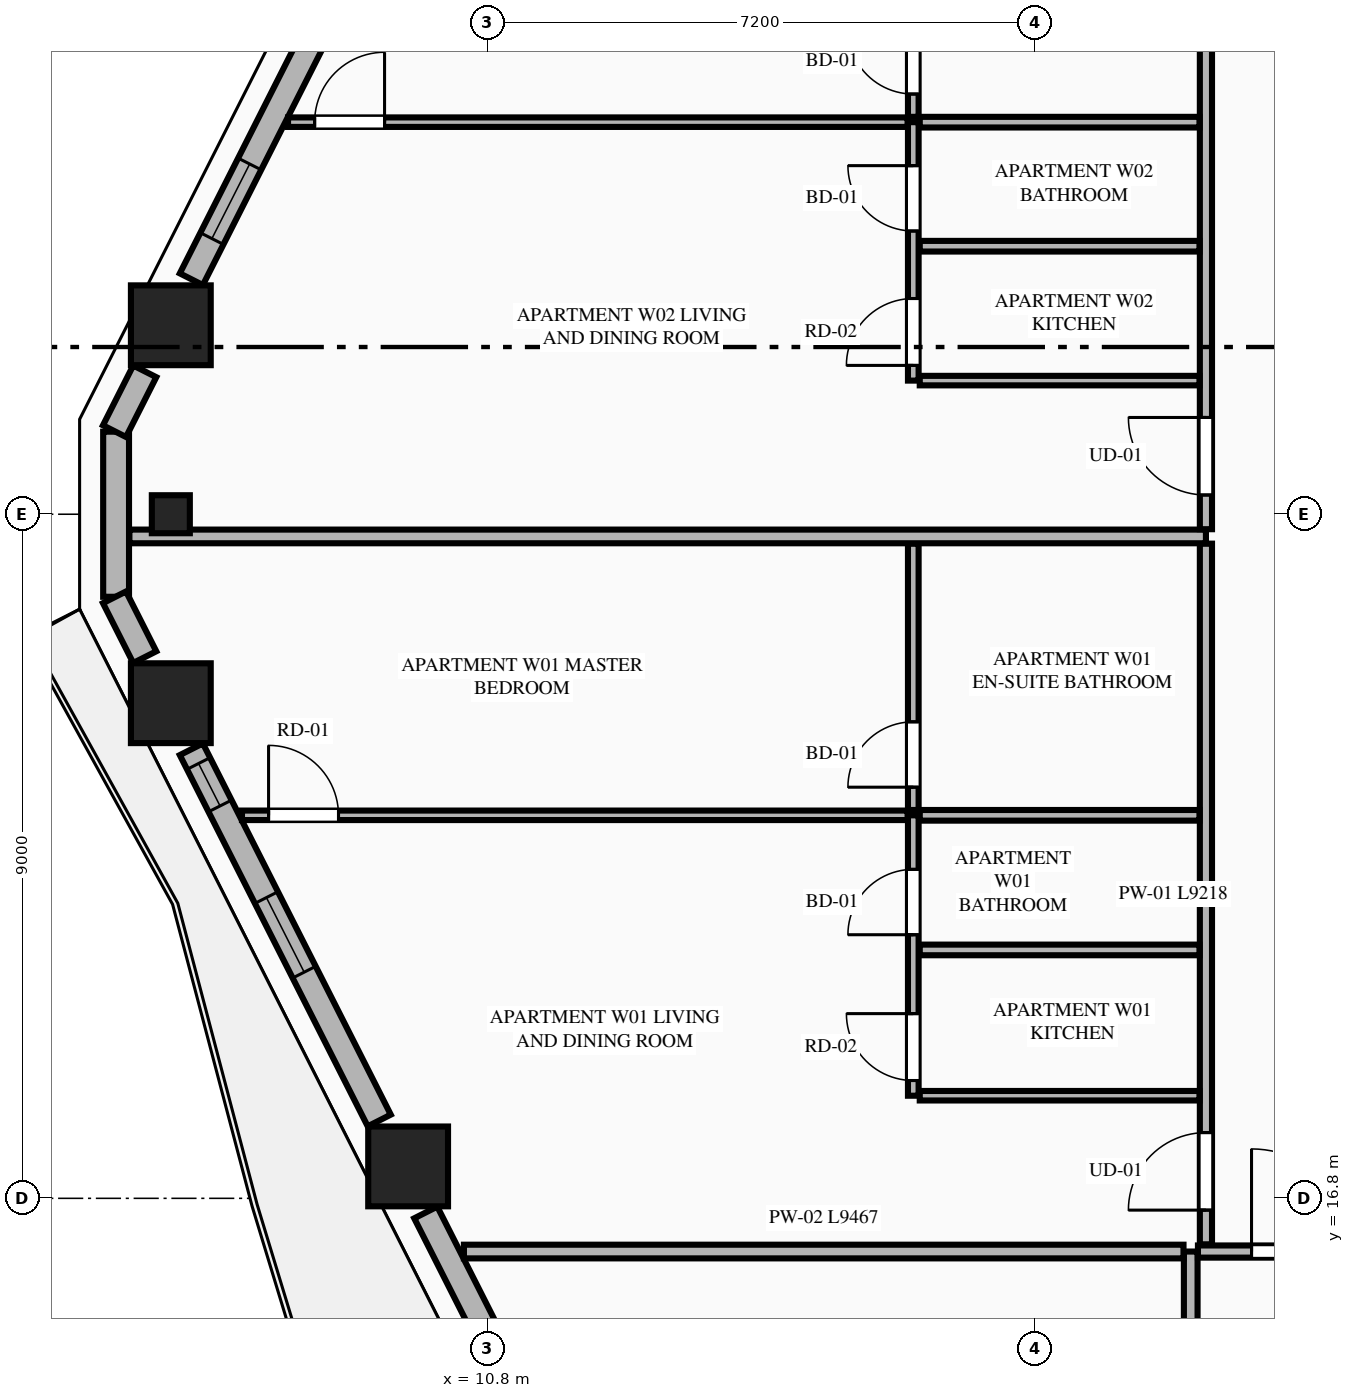
"""IFC4 building model, lengths in metres.
Left out: names, types, materials, properties, quantities, classifications, styles, units other than length and angle.
Written with IfcOpenShell. Run it as: python <this file> out.ifc"""

import sys

from ifc_helpers import new_model, si_unit, direction, frame, frame_2d, origin, origin_2d, place, context, subcontext, project, spatial, rectangle, extrude, element, fill, save


model = new_model("IFC4")
c1 = context("Model", 3, precision=1e-05, world=origin(), true_north=direction((0.0, 1.0)))
c2 = subcontext(c1, "Body", "Model", "MODEL_VIEW")
j1 = project(units=[si_unit("LENGTHUNIT", "METRE"), si_unit("PLANEANGLEUNIT", "RADIAN")], contexts=[c1])
p1 = place(None, origin())
s1 = spatial("IfcSite", under=j1, at=p1, CompositionType="ELEMENT")
p2 = place(p1, origin())
s2 = spatial("IfcBuilding", under=s1, at=p2, CompositionType="ELEMENT")
p3 = place(p2, frame((0.0, 0.0, 90.65)))
s3 = spatial("IfcBuildingStorey", under=s2, at=p3, CompositionType="ELEMENT", Elevation=90.65)
for number, where, z_axis, x_axis in (
    (1, (6.632, 28.286, 0.0), (0.0, 0.0, 1.0), (1.0, 0.0, 0.0)),
    (2, (6.632, 23.314, 0.0), (0.0, 0.0, 1.0), (1.0, 0.0, 0.0)),
    (3, (9.754, 17.22, 0.0), (0.0, 0.0, 1.0), (1.0, 0.0, 0.0)),
):
    element("IfcColumn", number, at=place(p3, frame(where, z_axis=z_axis, x_axis=x_axis)), inside=s3, PredefinedType="COLUMN", context=c2, shape_type="SweptSolid", body=[
        extrude(rectangle(XDim=1.05, YDim=1.05, at=origin_2d()), origin(), (0.0, 0.0, 1.0), 3.55),
    ])
p4 = place(p3, frame((6.632, 25.8, 0.0), z_axis=(0.0, 0.0, 1.0), x_axis=(0.0, -1.0, 0.0)))
e4 = element("IfcColumn", 4, at=p4, inside=s3, PredefinedType="PILASTER", context=c2, shape_type="SweptSolid", body=[
    extrude(rectangle(XDim=0.5, YDim=0.35, at=origin_2d()), origin(), (0.0, 0.0, 1.0), 3.55),
])
p5 = place(p3, frame((5.912, 26.886, 0.0), z_axis=(0.0, 0.0, 1.0), x_axis=(0.0, -1.0, 0.0)))
e5 = element("IfcWall", 5, at=p5, inside=s3, PredefinedType="STANDARD", context=c2, shape_type="SweptSolid", body=[
    extrude(rectangle(XDim=2.172, YDim=0.34, at=frame_2d((1.086, 0.0))), origin(), (0.0, 0.0, 1.0), 3.33),
])
p6 = place(p3, frame((9.374, 33.776, 0.0), z_axis=(0.0, 0.0, 1.0), x_axis=(-0.451597066012, -0.892221995901, 0.0)))
e6 = element("IfcWall", 6, at=p6, inside=s3, PredefinedType="STANDARD", context=c2, shape_type="SweptSolid", body=[
    extrude(rectangle(XDim=5.474, YDim=0.34, at=frame_2d((2.737, 0.0))), origin(), (0.0, 0.0, 1.0), 2.712),
])
p7 = place(p6, frame((0.918, 0.0, 0.75)))
e7 = element("IfcOpeningElement", 7, at=p7, cuts=e6, PredefinedType="OPENING", context=c2, shape_type="SweptSolid", body=[
    extrude(rectangle(XDim=1.1, YDim=1.812, at=frame_2d((0.55, 0.906))), frame((0.0, 0.18, 0.0), z_axis=(0.0, -1.0, 0.0), x_axis=(1.0, 0.0, 0.0)), (0.0, 0.0, 1.0), 0.36),
])
p8 = place(p6, frame((3.775, 0.0, 0.75)))
e8 = element("IfcOpeningElement", 8, at=p8, cuts=e6, PredefinedType="OPENING", context=c2, shape_type="SweptSolid", body=[
    extrude(rectangle(XDim=1.1, YDim=1.812, at=frame_2d((0.55, 0.906))), frame((0.0, 0.18, 0.0), z_axis=(0.0, -1.0, 0.0), x_axis=(1.0, 0.0, 0.0)), (0.0, 0.0, 1.0), 0.36),
])
p9 = place(p3, frame((6.289, 27.68, 0.0), z_axis=(0.0, 0.0, 1.0), x_axis=(-0.451306655769, -0.892368927327, 0.0)))
e9 = element("IfcWall", 9, at=p9, inside=s3, PredefinedType="STANDARD", context=c2, shape_type="SweptSolid", body=[
    extrude(rectangle(XDim=0.882, YDim=0.34, at=frame_2d((0.441, 0.0))), origin(), (0.0, 0.0, 1.0), 3.33),
])
p10 = place(p3, frame((5.891, 24.707, 0.0), z_axis=(0.0, 0.0, 1.0), x_axis=(0.451195173259, -0.892425299747, 0.0)))
e10 = element("IfcWall", 10, at=p10, inside=s3, PredefinedType="STANDARD", context=c2, shape_type="SweptSolid", body=[
    extrude(rectangle(XDim=0.882, YDim=0.34, at=frame_2d((0.441, 0.0))), origin(), (0.0, 0.0, 1.0), 3.33),
])
p11 = place(p3, frame((6.902, 22.708, 0.0), z_axis=(0.0, 0.0, 1.0), x_axis=(0.451579095309, -0.892231091523, 0.0)))
e11 = element("IfcWall", 11, at=p11, inside=s3, PredefinedType="STANDARD", context=c2, shape_type="SweptSolid", body=[
    extrude(rectangle(XDim=5.474, YDim=0.34, at=frame_2d((2.737, 0.0))), origin(), (0.0, 0.0, 1.0), 2.712),
])
p12 = place(p11, frame((2.187, 0.0, 0.75)))
e12 = element("IfcOpeningElement", 12, at=p12, cuts=e11, PredefinedType="OPENING", context=c2, shape_type="SweptSolid", body=[
    extrude(rectangle(XDim=1.1, YDim=1.812, at=frame_2d((0.55, 0.906))), frame((0.0, 0.18, 0.0), z_axis=(0.0, -1.0, 0.0), x_axis=(1.0, 0.0, 0.0)), (0.0, 0.0, 1.0), 0.36),
])
p13 = place(p11, frame((0.21, 0.0, 0.75)))
e13 = element("IfcOpeningElement", 13, at=p13, cuts=e11, PredefinedType="OPENING", context=c2, shape_type="SweptSolid", body=[
    extrude(rectangle(XDim=0.626, YDim=1.812, at=frame_2d((0.313, 0.906))), frame((0.0, 0.18, 0.0), z_axis=(0.0, -1.0, 0.0), x_axis=(1.0, 0.0, 0.0)), (0.0, 0.0, 1.0), 0.36),
])
p14 = place(p3, frame((9.986, 16.614, 0.0), z_axis=(0.0, 0.0, 1.0), x_axis=(0.45158267371, -0.892229280401, 0.0)))
e14 = element("IfcWall", 14, at=p14, inside=s3, PredefinedType="STANDARD", context=c2, shape_type="SweptSolid", body=[
    extrude(rectangle(XDim=5.715, YDim=0.34, at=frame_2d((2.857, 0.0))), origin(), (0.0, 0.0, 1.0), 2.712),
])
p15 = place(p14, frame((2.721, 0.0, 0.0)))
e15 = element("IfcOpeningElement", 15, at=p15, cuts=e14, PredefinedType="OPENING", context=c2, shape_type="SweptSolid", body=[
    extrude(rectangle(XDim=1.1, YDim=2.25, at=frame_2d((0.55, 1.125))), frame((0.0, 0.18, 0.0), z_axis=(0.0, -1.0, 0.0), x_axis=(1.0, 0.0, 0.0)), (0.0, 0.0, 1.0), 0.36),
])
p16 = place(p3, frame((20.05, 2.455, 0.0), z_axis=(0.0, 0.0, 1.0), x_axis=(0.0, 1.0, 0.0)))
e16 = element("IfcWall", 16, at=p16, inside=s3, PredefinedType="PARTITIONING", context=c2, shape_type="SweptSolid", body=[
    extrude(rectangle(XDim=13.645, YDim=0.18, at=frame_2d((6.823, 0.0))), origin(), (0.0, 0.0, 1.0), 3.33),
])
p17 = place(p3, frame((20.145, 16.1, 0.0), z_axis=(0.0, 0.0, 1.0), x_axis=(1.0, 0.0, 0.0)))
e17 = element("IfcWall", 17, at=p17, inside=s3, PredefinedType="PARTITIONING", context=c2, shape_type="SweptSolid", body=[
    extrude(rectangle(XDim=16.282, YDim=0.16, at=frame_2d((8.141, 0.0))), origin(), (0.0, 0.0, 1.0), 3.33),
])
p18 = place(p17, frame((0.705, 0.0, 0.0)))
e18 = element("IfcOpeningElement", 18, at=p18, cuts=e17, PredefinedType="OPENING", context=c2, shape_type="SweptSolid", body=[
    extrude(rectangle(XDim=1.35, YDim=2.35, at=frame_2d((0.675, 1.175))), frame((0.0, 0.09, 0.0), z_axis=(0.0, -1.0, 0.0), x_axis=(1.0, 0.0, 0.0)), (0.0, 0.0, 1.0), 0.18),
])
p19 = place(p3, frame((10.488, 16.1, 0.0), z_axis=(0.0, 0.0, 1.0), x_axis=(1.0, 0.0, 0.0)))
e19 = element("IfcWall", 19, at=p19, inside=s3, PredefinedType="PARTITIONING", context=c2, shape_type="SweptSolid", body=[
    extrude(rectangle(XDim=9.467, YDim=0.18, at=frame_2d((4.733, 0.0))), origin(), (0.0, 0.0, 1.0), 3.33),
])
p20 = place(p3, frame((20.25, 16.195, 0.0), z_axis=(0.0, 0.0, 1.0), x_axis=(0.0, 1.0, 0.0)))
e20 = element("IfcWall", 20, at=p20, inside=s3, PredefinedType="PARTITIONING", context=c2, shape_type="SweptSolid", body=[
    extrude(rectangle(XDim=9.218, YDim=0.16, at=frame_2d((4.609, 0.0))), origin(), (0.0, 0.0, 1.0), 2.637),
])
p21 = place(p20, frame((0.45, 0.0, 0.0)))
e21 = element("IfcOpeningElement", 21, at=p21, cuts=e20, PredefinedType="OPENING", context=c2, shape_type="SweptSolid", body=[
    extrude(rectangle(XDim=1.02, YDim=2.25, at=frame_2d((0.51, 1.125))), frame((0.0, 0.09, 0.0), z_axis=(0.0, -1.0, 0.0), x_axis=(1.0, 0.0, 0.0)), (0.0, 0.0, 1.0), 0.18),
])
p22 = place(p3, frame((16.485, 18.15, 0.0), z_axis=(0.0, 0.0, 1.0), x_axis=(1.0, 0.0, 0.0)))
e22 = element("IfcWall", 22, at=p22, inside=s3, PredefinedType="PARTITIONING", context=c2, shape_type="SweptSolid", body=[
    extrude(rectangle(XDim=3.68, YDim=0.125, at=frame_2d((1.84, 0.0))), origin(), (0.0, 0.0, 1.0), 2.637),
])
p23 = place(p3, frame((16.4, 18.15, 0.0), z_axis=(0.0, 0.0, 1.0), x_axis=(0.0, 1.0, 0.0)))
e23 = element("IfcWall", 23, at=p23, inside=s3, PredefinedType="PLUMBINGWALL", context=c2, shape_type="SweptSolid", body=[
    extrude(rectangle(XDim=3.689, YDim=0.14, at=frame_2d((1.845, 0.0))), origin(), (0.0, 0.0, 1.0), 3.33),
])
p24 = place(p23, frame((0.2, 0.0, 0.0)))
e24 = element("IfcOpeningElement", 24, at=p24, cuts=e23, PredefinedType="OPENING", context=c2, shape_type="SweptSolid", body=[
    extrude(rectangle(XDim=0.88, YDim=2.15, at=frame_2d((0.44, 1.075))), frame((0.0, 0.08, 0.0), z_axis=(0.0, -1.0, 0.0), x_axis=(1.0, 0.0, 0.0)), (0.0, 0.0, 1.0), 0.16),
])
p25 = place(p23, frame((2.118, 0.0, 0.0)))
e25 = element("IfcOpeningElement", 25, at=p25, cuts=e23, PredefinedType="OPENING", context=c2, shape_type="SweptSolid", body=[
    extrude(rectangle(XDim=0.86, YDim=2.1, at=frame_2d((0.43, 1.05))), frame((0.0, 0.08, 0.0), z_axis=(0.0, -1.0, 0.0), x_axis=(1.0, 0.0, 0.0)), (0.0, 0.0, 1.0), 0.16),
])
p26 = place(p3, frame((16.4, 21.909, 0.0), z_axis=(0.0, 0.0, 1.0), x_axis=(0.0, 1.0, 0.0)))
e26 = element("IfcWall", 26, at=p26, inside=s3, PredefinedType="PLUMBINGWALL", context=c2, shape_type="SweptSolid", body=[
    extrude(rectangle(XDim=3.504, YDim=0.14, at=frame_2d((1.752, 0.0))), origin(), (0.0, 0.0, 1.0), 3.33),
])
p27 = place(p26, frame((0.3, 0.0, 0.0)))
e27 = element("IfcOpeningElement", 27, at=p27, cuts=e26, PredefinedType="OPENING", context=c2, shape_type="SweptSolid", body=[
    extrude(rectangle(XDim=0.86, YDim=2.1, at=frame_2d((0.43, 1.05))), frame((0.0, 0.08, 0.0), z_axis=(0.0, -1.0, 0.0), x_axis=(1.0, 0.0, 0.0)), (0.0, 0.0, 1.0), 0.16),
])
p28 = place(p3, frame((16.485, 21.839, 0.0), z_axis=(0.0, 0.0, 1.0), x_axis=(1.0, 0.0, 0.0)))
e28 = element("IfcWall", 28, at=p28, inside=s3, PredefinedType="PLUMBINGWALL", context=c2, shape_type="SweptSolid", body=[
    extrude(rectangle(XDim=3.68, YDim=0.14, at=frame_2d((1.84, 0.0))), origin(), (0.0, 0.0, 1.0), 3.33),
])
p29 = place(p3, frame((7.568, 21.839, 0.0), z_axis=(0.0, 0.0, 1.0), x_axis=(1.0, 0.0, 0.0)))
e29 = element("IfcWall", 29, at=p29, inside=s3, PredefinedType="PARTITIONING", context=c2, shape_type="SweptSolid", body=[
    extrude(rectangle(XDim=8.757, YDim=0.125, at=frame_2d((4.378, 0.0))), origin(), (0.0, 0.0, 1.0), 3.33),
])
p30 = place(p29, frame((0.35, 0.0, 0.0)))
e30 = element("IfcOpeningElement", 30, at=p30, cuts=e29, PredefinedType="OPENING", context=c2, shape_type="SweptSolid", body=[
    extrude(rectangle(XDim=0.92, YDim=2.15, at=frame_2d((0.46, 1.075))), frame((0.0, 0.073, 0.0), z_axis=(0.0, -1.0, 0.0), x_axis=(1.0, 0.0, 0.0)), (0.0, 0.0, 1.0), 0.145),
])
p31 = place(p3, frame((16.485, 20.068, 0.0), z_axis=(0.0, 0.0, 1.0), x_axis=(1.0, 0.0, 0.0)))
e31 = element("IfcWall", 31, at=p31, inside=s3, PredefinedType="PLUMBINGWALL", context=c2, shape_type="SweptSolid", body=[
    extrude(rectangle(XDim=3.68, YDim=0.14, at=frame_2d((1.84, 0.0))), origin(), (0.0, 0.0, 1.0), 3.33),
])
p32 = place(p3, frame((6.087, 25.508, 0.0), z_axis=(0.0, 0.0, 1.0), x_axis=(1.0, 0.0, 0.0)))
e32 = element("IfcWall", 32, at=p32, inside=s3, PredefinedType="PARTITIONING", context=c2, shape_type="SweptSolid", body=[
    extrude(rectangle(XDim=14.163, YDim=0.18, at=frame_2d((7.082, 0.0))), origin(), (0.0, 0.0, 1.0), 3.33),
])
p33 = place(p3, frame((20.25, 25.603, 0.0), z_axis=(0.0, 0.0, 1.0), x_axis=(0.0, 1.0, 0.0)))
e33 = element("IfcWall", 33, at=p33, inside=s3, PredefinedType="PARTITIONING", context=c2, shape_type="SweptSolid", body=[
    extrude(rectangle(XDim=10.002, YDim=0.16, at=frame_2d((5.001, 0.0))), origin(), (0.0, 0.0, 1.0), 2.637),
])
p34 = place(p33, frame((0.45, 0.0, 0.0)))
e34 = element("IfcOpeningElement", 34, at=p34, cuts=e33, PredefinedType="OPENING", context=c2, shape_type="SweptSolid", body=[
    extrude(rectangle(XDim=1.02, YDim=2.25, at=frame_2d((0.51, 1.125))), frame((0.0, 0.09, 0.0), z_axis=(0.0, -1.0, 0.0), x_axis=(1.0, 0.0, 0.0)), (0.0, 0.0, 1.0), 0.18),
])
p35 = place(p3, frame((16.485, 27.558, 0.0), z_axis=(0.0, 0.0, 1.0), x_axis=(1.0, 0.0, 0.0)))
e35 = element("IfcWall", 35, at=p35, inside=s3, PredefinedType="PARTITIONING", context=c2, shape_type="SweptSolid", body=[
    extrude(rectangle(XDim=3.68, YDim=0.125, at=frame_2d((1.84, 0.0))), origin(), (0.0, 0.0, 1.0), 3.33),
])
p36 = place(p3, frame((16.4, 27.558, 0.0), z_axis=(0.0, 0.0, 1.0), x_axis=(0.0, 1.0, 0.0)))
e36 = element("IfcWall", 36, at=p36, inside=s3, PredefinedType="PLUMBINGWALL", context=c2, shape_type="SweptSolid", body=[
    extrude(rectangle(XDim=3.4, YDim=0.14, at=frame_2d((1.7, 0.0))), origin(), (0.0, 0.0, 1.0), 3.33),
])
p37 = place(p36, frame((0.2, 0.0, 0.0)))
e37 = element("IfcOpeningElement", 37, at=p37, cuts=e36, PredefinedType="OPENING", context=c2, shape_type="SweptSolid", body=[
    extrude(rectangle(XDim=0.88, YDim=2.15, at=frame_2d((0.44, 1.075))), frame((0.0, 0.08, 0.0), z_axis=(0.0, -1.0, 0.0), x_axis=(1.0, 0.0, 0.0)), (0.0, 0.0, 1.0), 0.16),
])
p38 = place(p36, frame((1.968, 0.0, 0.0)))
e38 = element("IfcOpeningElement", 38, at=p38, cuts=e36, PredefinedType="OPENING", context=c2, shape_type="SweptSolid", body=[
    extrude(rectangle(XDim=0.86, YDim=2.1, at=frame_2d((0.43, 1.05))), frame((0.0, 0.08, 0.0), z_axis=(0.0, -1.0, 0.0), x_axis=(1.0, 0.0, 0.0)), (0.0, 0.0, 1.0), 0.16),
])
p39 = place(p3, frame((16.4, 31.028, 0.0), z_axis=(0.0, 0.0, 1.0), x_axis=(0.0, 1.0, 0.0)))
e39 = element("IfcWall", 39, at=p39, inside=s3, PredefinedType="PLUMBINGWALL", context=c2, shape_type="SweptSolid", body=[
    extrude(rectangle(XDim=4.577, YDim=0.14, at=frame_2d((2.289, 0.0))), origin(), (0.0, 0.0, 1.0), 3.33),
])
p40 = place(p39, frame((0.3, 0.0, 0.0)))
e40 = element("IfcOpeningElement", 40, at=p40, cuts=e39, PredefinedType="OPENING", context=c2, shape_type="SweptSolid", body=[
    extrude(rectangle(XDim=0.86, YDim=2.1, at=frame_2d((0.43, 1.05))), frame((0.0, 0.08, 0.0), z_axis=(0.0, -1.0, 0.0), x_axis=(1.0, 0.0, 0.0)), (0.0, 0.0, 1.0), 0.16),
])
p41 = place(p3, frame((16.485, 30.958, 0.0), z_axis=(0.0, 0.0, 1.0), x_axis=(1.0, 0.0, 0.0)))
e41 = element("IfcWall", 41, at=p41, inside=s3, PredefinedType="PLUMBINGWALL", context=c2, shape_type="SweptSolid", body=[
    extrude(rectangle(XDim=3.68, YDim=0.14, at=frame_2d((1.84, 0.0))), origin(), (0.0, 0.0, 1.0), 3.33),
])
p42 = place(p3, frame((8.174, 30.958, 0.0), z_axis=(0.0, 0.0, 1.0), x_axis=(1.0, 0.0, 0.0)))
e42 = element("IfcWall", 42, at=p42, inside=s3, PredefinedType="PARTITIONING", context=c2, shape_type="SweptSolid", body=[
    extrude(rectangle(XDim=8.151, YDim=0.125, at=frame_2d((4.075, 0.0))), origin(), (0.0, 0.0, 1.0), 3.33),
])
p43 = place(p42, frame((0.35, 0.0, 0.0)))
e43 = element("IfcOpeningElement", 43, at=p43, cuts=e42, PredefinedType="OPENING", context=c2, shape_type="SweptSolid", body=[
    extrude(rectangle(XDim=0.92, YDim=2.15, at=frame_2d((0.46, 1.075))), frame((0.0, 0.073, 0.0), z_axis=(0.0, -1.0, 0.0), x_axis=(1.0, 0.0, 0.0)), (0.0, 0.0, 1.0), 0.145),
])
p44 = place(p3, frame((16.485, 29.326, 0.0), z_axis=(0.0, 0.0, 1.0), x_axis=(1.0, 0.0, 0.0)))
e44 = element("IfcWall", 44, at=p44, inside=s3, PredefinedType="PLUMBINGWALL", context=c2, shape_type="SweptSolid", body=[
    extrude(rectangle(XDim=3.68, YDim=0.14, at=frame_2d((1.84, 0.0))), origin(), (0.0, 0.0, 1.0), 3.33),
])
p45 = place(p12, origin())
e45 = element("IfcWindow", 45, at=p45, inside=s3, PartitioningType="SINGLE_PANEL", PredefinedType="WINDOW", context=c2, shape_type="SweptSolid", body=[
    extrude(rectangle(XDim=1.1, YDim=1.812, at=frame_2d((0.55, 0.906))), frame((0.0, 0.03, 0.0), z_axis=(0.0, -1.0, 0.0), x_axis=(1.0, 0.0, 0.0)), (0.0, 0.0, 1.0), 0.06),
])
fill(e12, e45)
p46 = place(p18, origin())
e46 = element("IfcDoor", 46, at=p46, inside=s3, OperationType="SINGLE_SWING_LEFT", PredefinedType="DOOR", context=c2, shape_type="SweptSolid", body=[
    extrude(rectangle(XDim=1.35, YDim=2.35, at=frame_2d((0.675, 1.175))), frame((0.0, 0.025, 0.0), z_axis=(0.0, -1.0, 0.0), x_axis=(1.0, 0.0, 0.0)), (0.0, 0.0, 1.0), 0.05),
])
fill(e18, e46)
p47 = place(p24, origin())
e47 = element("IfcDoor", 47, at=p47, inside=s3, OperationType="SINGLE_SWING_RIGHT", PredefinedType="DOOR", context=c2, shape_type="SweptSolid", body=[
    extrude(rectangle(XDim=0.88, YDim=2.15, at=frame_2d((0.44, 1.075))), frame((0.0, 0.025, 0.0), z_axis=(0.0, -1.0, 0.0), x_axis=(1.0, 0.0, 0.0)), (0.0, 0.0, 1.0), 0.05),
])
fill(e24, e47)
p48 = place(p25, origin())
e48 = element("IfcDoor", 48, at=p48, inside=s3, OperationType="SINGLE_SWING_LEFT", PredefinedType="DOOR", context=c2, shape_type="SweptSolid", body=[
    extrude(rectangle(XDim=0.86, YDim=2.1, at=frame_2d((0.43, 1.05))), frame((0.0, 0.025, 0.0), z_axis=(0.0, -1.0, 0.0), x_axis=(1.0, 0.0, 0.0)), (0.0, 0.0, 1.0), 0.05),
])
fill(e25, e48)
p49 = place(p27, origin())
e49 = element("IfcDoor", 49, at=p49, inside=s3, OperationType="SINGLE_SWING_LEFT", PredefinedType="DOOR", context=c2, shape_type="SweptSolid", body=[
    extrude(rectangle(XDim=0.86, YDim=2.1, at=frame_2d((0.43, 1.05))), frame((0.0, 0.025, 0.0), z_axis=(0.0, -1.0, 0.0), x_axis=(1.0, 0.0, 0.0)), (0.0, 0.0, 1.0), 0.05),
])
fill(e27, e49)
p50 = place(p21, origin())
e50 = element("IfcDoor", 50, at=p50, inside=s3, OperationType="SINGLE_SWING_LEFT", PredefinedType="DOOR", context=c2, shape_type="SweptSolid", body=[
    extrude(rectangle(XDim=1.02, YDim=2.25, at=frame_2d((0.51, 1.125))), frame((0.0, 0.025, 0.0), z_axis=(0.0, -1.0, 0.0), x_axis=(1.0, 0.0, 0.0)), (0.0, 0.0, 1.0), 0.05),
])
fill(e21, e50)
p51 = place(p30, origin())
e51 = element("IfcDoor", 51, at=p51, inside=s3, OperationType="SINGLE_SWING_LEFT", PredefinedType="DOOR", context=c2, shape_type="SweptSolid", body=[
    extrude(rectangle(XDim=0.92, YDim=2.15, at=frame_2d((0.46, 1.075))), frame((0.0, 0.025, 0.0), z_axis=(0.0, -1.0, 0.0), x_axis=(1.0, 0.0, 0.0)), (0.0, 0.0, 1.0), 0.05),
])
fill(e30, e51)
p52 = place(p37, origin())
e52 = element("IfcDoor", 52, at=p52, inside=s3, OperationType="SINGLE_SWING_LEFT", PredefinedType="DOOR", context=c2, shape_type="SweptSolid", body=[
    extrude(rectangle(XDim=0.88, YDim=2.15, at=frame_2d((0.44, 1.075))), frame((0.0, 0.025, 0.0), z_axis=(0.0, -1.0, 0.0), x_axis=(1.0, 0.0, 0.0)), (0.0, 0.0, 1.0), 0.05),
])
fill(e37, e52)
p53 = place(p38, origin())
e53 = element("IfcDoor", 53, at=p53, inside=s3, OperationType="SINGLE_SWING_RIGHT", PredefinedType="DOOR", context=c2, shape_type="SweptSolid", body=[
    extrude(rectangle(XDim=0.86, YDim=2.1, at=frame_2d((0.43, 1.05))), frame((0.0, 0.025, 0.0), z_axis=(0.0, -1.0, 0.0), x_axis=(1.0, 0.0, 0.0)), (0.0, 0.0, 1.0), 0.05),
])
fill(e38, e53)
p54 = place(p40, origin())
e54 = element("IfcDoor", 54, at=p54, inside=s3, OperationType="SINGLE_SWING_RIGHT", PredefinedType="DOOR", context=c2, shape_type="SweptSolid", body=[
    extrude(rectangle(XDim=0.86, YDim=2.1, at=frame_2d((0.43, 1.05))), frame((0.0, 0.025, 0.0), z_axis=(0.0, -1.0, 0.0), x_axis=(1.0, 0.0, 0.0)), (0.0, 0.0, 1.0), 0.05),
])
fill(e40, e54)
p55 = place(p34, origin())
e55 = element("IfcDoor", 55, at=p55, inside=s3, OperationType="SINGLE_SWING_RIGHT", PredefinedType="DOOR", context=c2, shape_type="SweptSolid", body=[
    extrude(rectangle(XDim=1.02, YDim=2.25, at=frame_2d((0.51, 1.125))), frame((0.0, 0.025, 0.0), z_axis=(0.0, -1.0, 0.0), x_axis=(1.0, 0.0, 0.0)), (0.0, 0.0, 1.0), 0.05),
])
fill(e34, e55)
p56 = place(p43, origin())
e56 = element("IfcDoor", 56, at=p56, inside=s3, OperationType="SINGLE_SWING_RIGHT", PredefinedType="DOOR", context=c2, shape_type="SweptSolid", body=[
    extrude(rectangle(XDim=0.92, YDim=2.15, at=frame_2d((0.46, 1.075))), frame((0.0, 0.025, 0.0), z_axis=(0.0, -1.0, 0.0), x_axis=(1.0, 0.0, 0.0)), (0.0, 0.0, 1.0), 0.05),
])
fill(e43, e56)
p57 = place(p8, origin())
e57 = element("IfcWindow", 57, at=p57, inside=s3, PartitioningType="SINGLE_PANEL", PredefinedType="WINDOW", context=c2, shape_type="SweptSolid", body=[
    extrude(rectangle(XDim=1.1, YDim=1.812, at=frame_2d((0.55, 0.906))), frame((0.0, 0.03, 0.0), z_axis=(0.0, -1.0, 0.0), x_axis=(1.0, 0.0, 0.0)), (0.0, 0.0, 1.0), 0.06),
])
fill(e8, e57)
p58 = place(p13, origin())
e58 = element("IfcWindow", 58, at=p58, inside=s3, PartitioningType="SINGLE_PANEL", PredefinedType="WINDOW", context=c2, shape_type="SweptSolid", body=[
    extrude(rectangle(XDim=0.626, YDim=1.812, at=frame_2d((0.313, 0.906))), frame((0.0, 0.03, 0.0), z_axis=(0.0, -1.0, 0.0), x_axis=(1.0, 0.0, 0.0)), (0.0, 0.0, 1.0), 0.06),
])
fill(e13, e58)
save(model, sys.argv[1])
